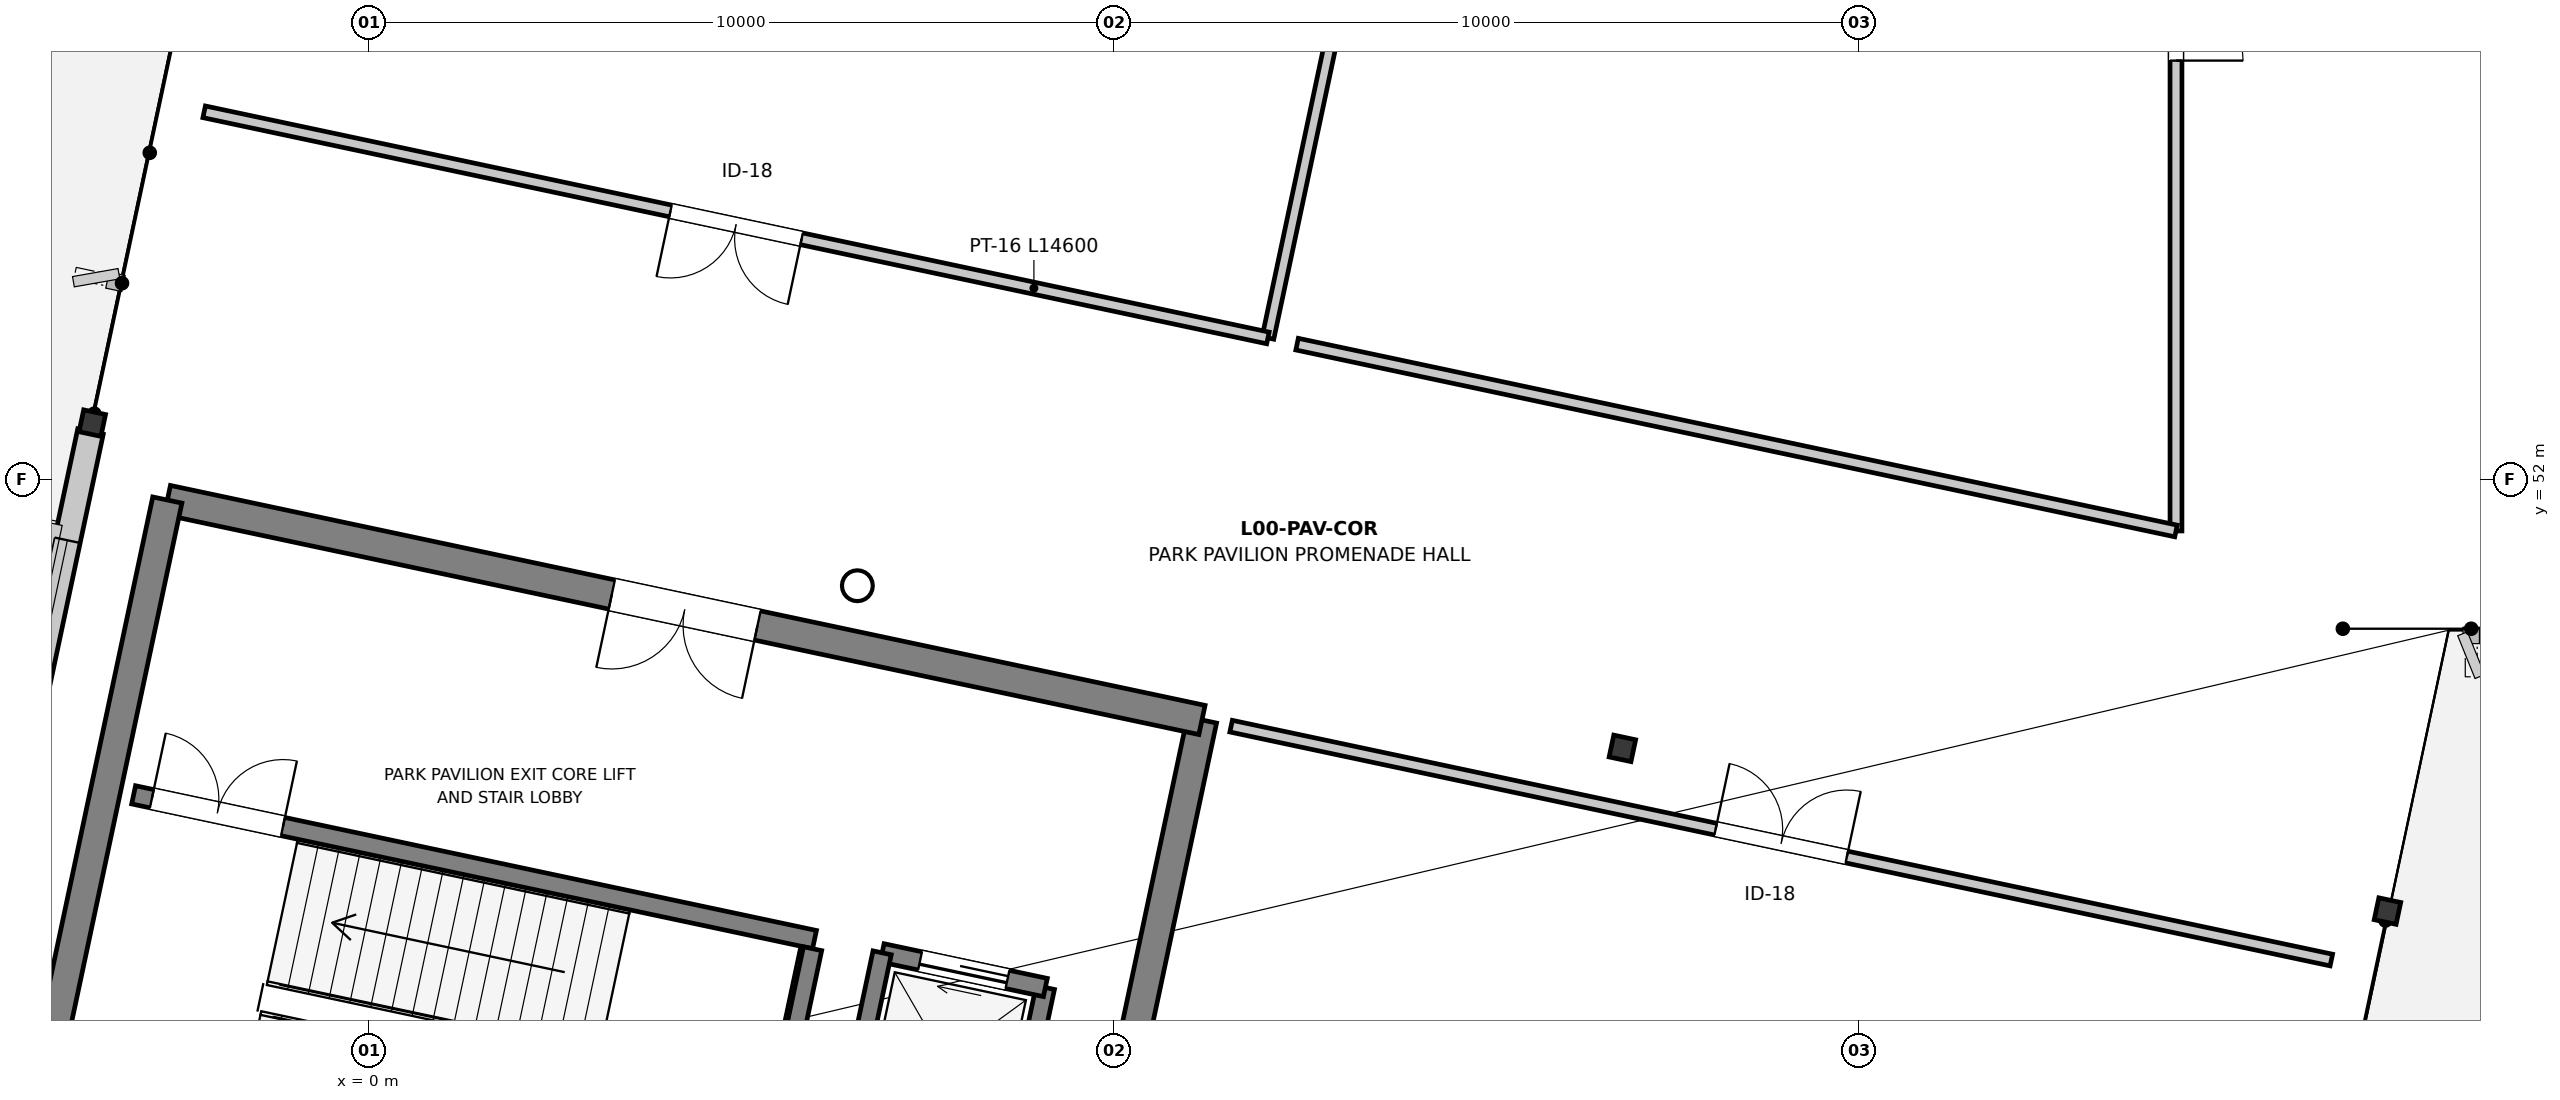
"""IFC4 building model, lengths in metres.
Left out: names, types, materials, properties, quantities, classifications, styles, units other than length and angle.
Written with IfcOpenShell. Run it as: python <this file> out.ifc"""

import sys

from ifc_helpers import new_model, si_unit, direction, frame, frame_2d, origin, origin_2d, place, context, subcontext, project, spatial, rectangle, hollow_rectangle, hollow_circle, i_section, extrude, element, fill, save


model = new_model("IFC4")
c1 = context("Model", 3, precision=1e-05, world=origin(), true_north=direction((0.0, 1.0)))
c2 = subcontext(c1, "Body", "Model", "MODEL_VIEW")
j1 = project(units=[si_unit("LENGTHUNIT", "METRE"), si_unit("PLANEANGLEUNIT", "RADIAN")], contexts=[c1])
p1 = place(None, origin())
s1 = spatial("IfcSite", under=j1, at=p1, CompositionType="ELEMENT")
p2 = place(p1, origin())
s2 = spatial("IfcBuilding", under=s1, at=p2, CompositionType="ELEMENT")
p3 = place(p2, origin())
s3 = spatial("IfcBuildingStorey", under=s2, at=p3, CompositionType="ELEMENT", Elevation=0.0)
p4 = place(p3, frame((-3.713, 52.76, 0.0), z_axis=(0.0, 0.0, 1.0), x_axis=(0.978147600734, -0.207911690818, 0.0)))
e1 = element("IfcColumn", 1, at=p4, inside=s3, PredefinedType="COLUMN", context=c2, shape_type="SweptSolid", body=[
    extrude(i_section(OverallWidth=0.3, OverallDepth=0.3, WebThickness=0.011, FlangeThickness=0.019, FilletRadius=0.027, at=origin_2d()), origin(), (0.0, 0.0, 1.0), 6.0),
])
p5 = place(p3, frame((6.558, 50.577, 0.0), z_axis=(0.0, 0.0, 1.0), x_axis=(0.978147600734, -0.207911690818, 0.0)))
e2 = element("IfcColumn", 2, at=p5, inside=s3, PredefinedType="COLUMN", context=c2, shape_type="SweptSolid", body=[
    extrude(hollow_circle(Radius=0.203, WallThickness=0.016, at=origin_2d()), origin(), (0.0, 0.0, 1.0), 6.0),
])
p6 = place(p3, frame((16.828, 48.394, 0.0), z_axis=(0.0, 0.0, 1.0), x_axis=(0.978147600734, -0.207911690818, 0.0)))
e3 = element("IfcColumn", 3, at=p6, inside=s3, PredefinedType="COLUMN", context=c2, shape_type="SweptSolid", body=[
    extrude(hollow_rectangle(XDim=0.3, YDim=0.3, WallThickness=0.016, InnerFilletRadius=0.016, OuterFilletRadius=0.032, at=origin_2d()), origin(), (0.0, 0.0, 1.0), 6.0),
])
p7 = place(p3, frame((27.099, 46.21, 0.0), z_axis=(0.0, 0.0, 1.0), x_axis=(0.978147600734, -0.207911690818, 0.0)))
e4 = element("IfcColumn", 4, at=p7, inside=s3, PredefinedType="COLUMN", context=c2, shape_type="SweptSolid", body=[
    extrude(i_section(OverallWidth=0.3, OverallDepth=0.3, WebThickness=0.011, FlangeThickness=0.019, FilletRadius=0.027, at=origin_2d()), origin(), (0.0, 0.0, 1.0), 6.0),
])
p8 = place(p3, frame((-3.737, 52.648, 0.0), z_axis=(0.0, 0.0, 1.0), x_axis=(-0.207913167485, -0.978147286857, 0.0)))
e5 = element("IfcWall", 5, at=p8, inside=s3, PredefinedType="STANDARD", context=c2, shape_type="SweptSolid", body=[
    extrude(rectangle(XDim=10.77, YDim=0.35, at=frame_2d((5.385, 0.0))), origin(), (0.0, 0.0, 1.0), 5.025),
])
p9 = place(p8, frame((1.493, 0.0, 0.85)))
e6 = element("IfcOpeningElement", 6, at=p9, cuts=e5, PredefinedType="OPENING", context=c2, shape_type="SweptSolid", body=[
    extrude(rectangle(XDim=2.4, YDim=1.8, at=frame_2d((1.2, 0.9))), frame((0.0, 0.185, 0.0), z_axis=(0.0, -1.0, 0.0), x_axis=(1.0, 0.0, 0.0)), (0.0, 0.0, 1.0), 0.37),
])
p10 = place(p8, frame((6.878, 0.0, 0.85)))
e7 = element("IfcOpeningElement", 7, at=p10, cuts=e5, PredefinedType="OPENING", context=c2, shape_type="SweptSolid", body=[
    extrude(rectangle(XDim=2.4, YDim=1.8, at=frame_2d((1.2, 0.9))), frame((0.0, 0.185, 0.0), z_axis=(0.0, -1.0, 0.0), x_axis=(1.0, 0.0, 0.0)), (0.0, 0.0, 1.0), 0.37),
])
p11 = place(p3, frame((8.574, 42.797, 0.0), z_axis=(0.0, 0.0, 1.0), x_axis=(0.207908261464, 0.978148329659, 0.0)))
e8 = element("IfcWall", 8, at=p11, inside=s3, PredefinedType="SOLIDWALL", context=c2, shape_type="SweptSolid", body=[
    extrude(rectangle(XDim=2.44, YDim=0.25, at=frame_2d((1.22, 0.0))), origin(), (0.0, 0.0, 1.0), 5.64),
])
p12 = place(p3, frame((9.082, 45.184, 0.0), z_axis=(0.0, 0.0, 1.0), x_axis=(-0.978150567781, 0.207897731466, 0.0)))
e9 = element("IfcWall", 9, at=p12, inside=s3, PredefinedType="SOLIDWALL", context=c2, shape_type="SweptSolid", body=[
    extrude(rectangle(XDim=2.24, YDim=0.25, at=frame_2d((1.12, 0.0))), origin(), (0.0, 0.0, 1.0), 5.64),
])
p13 = place(p12, frame((0.52, 0.0, 0.0)))
e10 = element("IfcOpeningElement", 10, at=p13, cuts=e9, PredefinedType="OPENING", context=c2, shape_type="SweptSolid", body=[
    extrude(rectangle(XDim=1.2, YDim=2.2, at=frame_2d((0.6, 1.1))), frame((0.0, 0.135, 0.0), z_axis=(0.0, -1.0, 0.0), x_axis=(1.0, 0.0, 0.0)), (0.0, 0.0, 1.0), 0.27),
])
p14 = place(p3, frame((6.891, 45.65, 0.0), z_axis=(0.0, 0.0, 1.0), x_axis=(-0.207908261464, -0.978148329659, 0.0)))
e11 = element("IfcWall", 11, at=p14, inside=s3, PredefinedType="SOLIDWALL", context=c2, shape_type="SweptSolid", body=[
    extrude(rectangle(XDim=2.44, YDim=0.25, at=frame_2d((1.22, 0.0))), origin(), (0.0, 0.0, 1.0), 5.64),
])
p15 = place(p3, frame((-3.158, 47.77, 0.0), z_axis=(0.0, 0.0, 1.0), x_axis=(0.978146230105, -0.207918139013, 0.0)))
e12 = element("IfcWall", 12, at=p15, inside=s3, PredefinedType="SOLIDWALL", context=c2, shape_type="SweptSolid", body=[
    extrude(rectangle(XDim=9.345, YDim=0.25, at=frame_2d((4.673, 0.0))), origin(), (0.0, 0.0, 1.0), 5.62),
])
p16 = place(p15, frame((0.25, 0.0, 0.0)))
e13 = element("IfcOpeningElement", 13, at=p16, cuts=e12, PredefinedType="OPENING", context=c2, shape_type="SweptSolid", body=[
    extrude(rectangle(XDim=1.8, YDim=2.25, at=frame_2d((0.9, 1.125))), frame((0.0, 0.135, 0.0), z_axis=(0.0, -1.0, 0.0), x_axis=(1.0, 0.0, 0.0)), (0.0, 0.0, 1.0), 0.27),
])
p17 = place(p3, frame((4.977, 41.098, 0.0), z_axis=(0.0, 0.0, 1.0), x_axis=(0.207897606308, 0.978150594383, 0.0)))
e14 = element("IfcWall", 14, at=p17, inside=s3, PredefinedType="SOLIDWALL", context=c2, shape_type="SweptSolid", body=[
    extrude(rectangle(XDim=4.71, YDim=0.25, at=frame_2d((2.355, 0.0))), origin(), (0.0, 0.0, 1.0), 5.62),
])
p18 = place(p3, frame((9.313, 39.972, 0.0), z_axis=(0.0, 0.0, 1.0), x_axis=(0.20791177806, 0.97814758219, 0.0)))
e15 = element("IfcWall", 15, at=p18, inside=s3, PredefinedType="SHEAR", context=c2, shape_type="SweptSolid", body=[
    extrude(rectangle(XDim=9.0, YDim=0.4, at=frame_2d((4.5, 0.0))), origin(), (0.0, 0.0, 1.0), 5.64),
])
p19 = place(p3, frame((11.184, 48.775, 0.0), z_axis=(0.0, 0.0, 1.0), x_axis=(-0.978148272054, 0.20790853248, 0.0)))
e16 = element("IfcWall", 16, at=p19, inside=s3, PredefinedType="SHEAR", context=c2, shape_type="SweptSolid", body=[
    extrude(rectangle(XDim=14.2, YDim=0.4, at=frame_2d((7.1, 0.0))), origin(), (0.0, 0.0, 1.0), 5.64),
])
p20 = place(p19, frame((6.1, 0.0, 0.0)))
e17 = element("IfcOpeningElement", 17, at=p20, cuts=e16, PredefinedType="OPENING", context=c2, shape_type="SweptSolid", body=[
    extrude(rectangle(XDim=2.0, YDim=2.3, at=frame_2d((1.0, 1.15))), frame((0.0, 0.21, 0.0), z_axis=(0.0, -1.0, 0.0), x_axis=(1.0, 0.0, 0.0)), (0.0, 0.0, 1.0), 0.42),
])
p21 = place(p3, frame((-2.705, 51.728, 0.0), z_axis=(0.0, 0.0, 1.0), x_axis=(-0.20791177806, -0.97814758219, 0.0)))
e18 = element("IfcWall", 18, at=p21, inside=s3, PredefinedType="SHEAR", context=c2, shape_type="SweptSolid", body=[
    extrude(rectangle(XDim=9.0, YDim=0.4, at=frame_2d((4.5, 0.0))), origin(), (0.0, 0.0, 1.0), 5.64),
])
p22 = place(p3, frame((17.891, 81.291, 0.0), z_axis=(0.0, 0.0, 1.0), x_axis=(-0.207910994878, -0.97814774866, 0.0)))
e19 = element("IfcWall", 19, at=p22, inside=s3, PredefinedType="PARTITIONING", context=c2, shape_type="SweptSolid", body=[
    extrude(rectangle(XDim=28.0, YDim=0.16, at=frame_2d((14.0, 0.0))), origin(), (0.0, 0.0, 1.0), 5.115),
])
p23 = place(p3, frame((12.07, 53.903, 0.0), z_axis=(0.0, 0.0, 1.0), x_axis=(-0.978147882902, 0.207910363318, 0.0)))
e20 = element("IfcWall", 20, at=p23, inside=s3, PredefinedType="PARTITIONING", context=c2, shape_type="SweptSolid", body=[
    extrude(rectangle(XDim=14.6, YDim=0.16, at=frame_2d((7.3, 0.0))), origin(), (0.0, 0.0, 1.0), 5.015),
])
p24 = place(p23, frame((6.4, 0.0, 0.0)))
e21 = element("IfcOpeningElement", 21, at=p24, cuts=e20, PredefinedType="OPENING", context=c2, shape_type="SweptSolid", body=[
    extrude(rectangle(XDim=1.8, YDim=2.25, at=frame_2d((0.9, 1.125))), frame((0.0, 0.09, 0.0), z_axis=(0.0, -1.0, 0.0), x_axis=(1.0, 0.0, 0.0)), (0.0, 0.0, 1.0), 0.18),
])
p25 = place(p3, frame((24.26, 65.74, 0.0), z_axis=(0.0, 0.0, 1.0), x_axis=(0.0, -1.0, 0.0)))
e22 = element("IfcWall", 22, at=p25, inside=s3, PredefinedType="PARTITIONING", context=c2, shape_type="SweptSolid", body=[
    extrude(rectangle(XDim=14.428, YDim=0.16, at=frame_2d((7.214, 0.0))), origin(), (0.0, 0.0, 1.0), 5.075),
])
p26 = place(p25, frame((6.314, 0.0, 0.0)))
e23 = element("IfcOpeningElement", 23, at=p26, cuts=e22, PredefinedType="OPENING", context=c2, shape_type="SweptSolid", body=[
    extrude(rectangle(XDim=1.8, YDim=2.25, at=frame_2d((0.9, 1.125))), frame((0.0, 0.09, 0.0), z_axis=(0.0, -1.0, 0.0), x_axis=(1.0, 0.0, 0.0)), (0.0, 0.0, 1.0), 0.18),
])
p27 = place(p3, frame((24.26, 51.312, 0.0), z_axis=(0.0, 0.0, 1.0), x_axis=(-0.978147198247, 0.207913584359, 0.0)))
e24 = element("IfcWall", 24, at=p27, inside=s3, PredefinedType="PARTITIONING", context=c2, shape_type="SweptSolid", body=[
    extrude(rectangle(XDim=12.063, YDim=0.16, at=frame_2d((6.031, 0.0))), origin(), (0.0, 0.0, 1.0), 4.975),
])
p28 = place(p3, frame((11.575, 48.692, 0.0), z_axis=(0.0, 0.0, 1.0), x_axis=(0.978147353885, -0.207912852149, 0.0)))
e25 = element("IfcWall", 25, at=p28, inside=s3, PredefinedType="PARTITIONING", context=c2, shape_type="SweptSolid", body=[
    extrude(rectangle(XDim=15.1, YDim=0.16, at=frame_2d((7.55, 0.0))), origin(), (0.0, 0.0, 1.0), 5.015),
])
p29 = place(p28, frame((6.65, 0.0, 0.0)))
e26 = element("IfcOpeningElement", 26, at=p29, cuts=e25, PredefinedType="OPENING", context=c2, shape_type="SweptSolid", body=[
    extrude(rectangle(XDim=1.8, YDim=2.25, at=frame_2d((0.9, 1.125))), frame((0.0, 0.09, 0.0), z_axis=(0.0, -1.0, 0.0), x_axis=(1.0, 0.0, 0.0)), (0.0, 0.0, 1.0), 0.18),
])
p30 = place(p9, origin())
e27 = element("IfcWindow", 27, at=p30, inside=s3, PartitioningType="SINGLE_PANEL", PredefinedType="WINDOW", context=c2, shape_type="SweptSolid", body=[
    extrude(rectangle(XDim=2.4, YDim=1.8, at=frame_2d((1.2, 0.9))), frame((0.0, 0.03, 0.0), z_axis=(0.0, -1.0, 0.0), x_axis=(1.0, 0.0, 0.0)), (0.0, 0.0, 1.0), 0.06),
])
fill(e6, e27)
p31 = place(p13, origin())
e28 = element("IfcDoor", 28, at=p31, inside=s3, OperationType="SLIDING_TO_RIGHT", PredefinedType="DOOR", context=c2, shape_type="SweptSolid", body=[
    extrude(rectangle(XDim=1.2, YDim=2.2, at=frame_2d((0.6, 1.1))), frame((0.0, 0.025, 0.0), z_axis=(0.0, -1.0, 0.0), x_axis=(1.0, 0.0, 0.0)), (0.0, 0.0, 1.0), 0.05),
])
fill(e10, e28)
p32 = place(p16, origin())
e29 = element("IfcDoor", 29, at=p32, inside=s3, OperationType="DOUBLE_DOOR_SINGLE_SWING", PredefinedType="DOOR", context=c2, shape_type="SweptSolid", body=[
    extrude(rectangle(XDim=1.8, YDim=2.25, at=frame_2d((0.9, 1.125))), frame((0.0, 0.025, 0.0), z_axis=(0.0, -1.0, 0.0), x_axis=(1.0, 0.0, 0.0)), (0.0, 0.0, 1.0), 0.05),
])
fill(e13, e29)
p33 = place(p20, origin())
e30 = element("IfcDoor", 30, at=p33, inside=s3, OperationType="DOUBLE_DOOR_SINGLE_SWING", PredefinedType="DOOR", context=c2, shape_type="SweptSolid", body=[
    extrude(rectangle(XDim=2.0, YDim=2.3, at=frame_2d((1.0, 1.15))), frame((0.0, 0.025, 0.0), z_axis=(0.0, -1.0, 0.0), x_axis=(1.0, 0.0, 0.0)), (0.0, 0.0, 1.0), 0.05),
])
fill(e17, e30)
p34 = place(p24, origin())
e31 = element("IfcDoor", 31, at=p34, inside=s3, OperationType="DOUBLE_DOOR_SINGLE_SWING", PredefinedType="DOOR", context=c2, shape_type="SweptSolid", body=[
    extrude(rectangle(XDim=1.8, YDim=2.25, at=frame_2d((0.9, 1.125))), frame((0.0, 0.025, 0.0), z_axis=(0.0, -1.0, 0.0), x_axis=(1.0, 0.0, 0.0)), (0.0, 0.0, 1.0), 0.05),
])
fill(e21, e31)
p35 = place(p26, origin())
e32 = element("IfcDoor", 32, at=p35, inside=s3, OperationType="DOUBLE_DOOR_SINGLE_SWING", PredefinedType="DOOR", context=c2, shape_type="SweptSolid", body=[
    extrude(rectangle(XDim=1.8, YDim=2.25, at=frame_2d((0.9, 1.125))), frame((0.0, 0.025, 0.0), z_axis=(0.0, -1.0, 0.0), x_axis=(1.0, 0.0, 0.0)), (0.0, 0.0, 1.0), 0.05),
])
fill(e23, e32)
p36 = place(p29, origin())
e33 = element("IfcDoor", 33, at=p36, inside=s3, OperationType="DOUBLE_DOOR_SINGLE_SWING", PredefinedType="DOOR", context=c2, shape_type="SweptSolid", body=[
    extrude(rectangle(XDim=1.8, YDim=2.25, at=frame_2d((0.9, 1.125))), frame((0.0, 0.025, 0.0), z_axis=(0.0, -1.0, 0.0), x_axis=(1.0, 0.0, 0.0)), (0.0, 0.0, 1.0), 0.05),
])
fill(e26, e33)
save(model, sys.argv[1])
